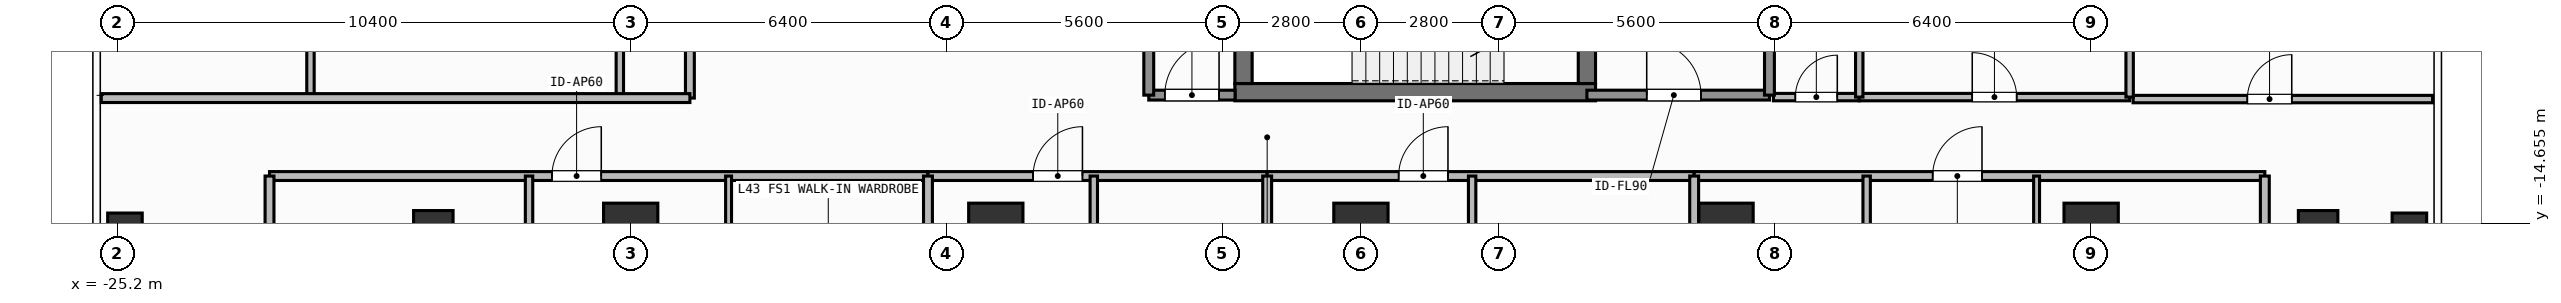
"""IFC4 building model, lengths in metres.
Left out: names, types, materials, properties, quantities, classifications, styles, units other than length and angle.
Written with IfcOpenShell. Run it as: python <this file> out.ifc"""

import sys

from ifc_helpers import new_model, si_unit, direction, frame, frame_2d, origin, origin_2d, place, context, subcontext, project, spatial, rectangle, hollow_rectangle, extrude, element, fill, save


model = new_model("IFC4")
c1 = context("Model", 3, precision=1e-05, world=origin(), true_north=direction((0.0, 1.0)))
c2 = subcontext(c1, "Body", "Model", "MODEL_VIEW")
j1 = project(units=[si_unit("LENGTHUNIT", "METRE"), si_unit("PLANEANGLEUNIT", "RADIAN")], contexts=[c1])
p1 = place(None, origin())
s1 = spatial("IfcSite", under=j1, at=p1, CompositionType="ELEMENT")
p2 = place(p1, origin())
s2 = spatial("IfcBuilding", under=s1, at=p2, CompositionType="ELEMENT")
p3 = place(p2, frame((0.0, 0.0, 175.8)))
s3 = spatial("IfcBuildingStorey", under=s2, at=p3, CompositionType="ELEMENT", Elevation=175.8)
p4 = place(p3, frame((-2.555, -12.0, 0.0), z_axis=(0.0, 0.0, 1.0), x_axis=(1.0, 0.0, 0.0)))
e1 = element("IfcWall", 1, at=p4, inside=s3, PredefinedType="SHEAR", context=c2, shape_type="SweptSolid", body=[
    extrude(rectangle(XDim=7.31, YDim=0.35, at=frame_2d((3.655, 0.0))), origin(), (0.0, 0.0, 1.0), 3.9),
])
p5 = place(p3, frame((-2.38, -11.825, 0.0), z_axis=(0.0, 0.0, 1.0), x_axis=(0.0, 1.0, 0.0)))
e2 = element("IfcWall", 2, at=p5, inside=s3, PredefinedType="SHEAR", context=c2, shape_type="SweptSolid", body=[
    extrude(rectangle(XDim=2.925, YDim=0.35, at=frame_2d((1.462, 0.0))), origin(), (0.0, 0.0, 1.0), 3.9),
])
p6 = place(p3, frame((4.58, -8.9, 0.0), z_axis=(0.0, 0.0, 1.0), x_axis=(0.0, -1.0, 0.0)))
e3 = element("IfcWall", 3, at=p6, inside=s3, PredefinedType="SHEAR", context=c2, shape_type="SweptSolid", body=[
    extrude(rectangle(XDim=2.925, YDim=0.35, at=frame_2d((1.462, 0.0))), origin(), (0.0, 0.0, 1.0), 3.9),
])
p7 = place(p6, frame((0.913, 0.0, 0.0)))
e4 = element("IfcOpeningElement", 4, at=p7, cuts=e3, PredefinedType="OPENING", context=c2, shape_type="SweptSolid", body=[
    extrude(rectangle(XDim=1.1, YDim=2.15, at=frame_2d((0.55, 1.075))), frame((0.0, 0.185, 0.0), z_axis=(0.0, -1.0, 0.0), x_axis=(1.0, 0.0, 0.0)), (0.0, 0.0, 1.0), 0.37),
])
for number, where, z_axis, x_axis in (
    (5, (-14.8, -14.8, 0.0), (0.0, 0.0, 1.0), (1.0, 0.0, 0.0)),
    (6, (-7.4, -14.8, 0.0), (0.0, 0.0, 1.0), (1.0, 0.0, 0.0)),
    (7, (0.0, -14.8, 0.0), (0.0, 0.0, 1.0), (1.0, 0.0, 0.0)),
    (8, (7.4, -14.8, 0.0), (0.0, 0.0, 1.0), (1.0, 0.0, 0.0)),
    (9, (14.8, -14.8, 0.0), (0.0, 0.0, 1.0), (1.0, 0.0, 0.0)),
):
    element("IfcColumn", number, at=place(p3, frame(where, z_axis=z_axis, x_axis=x_axis)), inside=s3, PredefinedType="COLUMN", context=c2, shape_type="SweptSolid", body=[
        extrude(rectangle(XDim=1.1, YDim=1.1, at=origin_2d()), origin(), (0.0, 0.0, 1.0), 3.9),
    ])
for number, where, z_axis, x_axis in (
    (10, (-18.8, -14.8, 0.0), (0.0, 0.0, 1.0), (1.0, 0.0, 0.0)),
    (11, (19.4, -14.8, 0.0), (0.0, 0.0, 1.0), (1.0, 0.0, 0.0)),
):
    element("IfcColumn", number, at=place(p3, frame(where, z_axis=z_axis, x_axis=x_axis)), inside=s3, PredefinedType="COLUMN", context=c2, shape_type="SweptSolid", body=[
        extrude(hollow_rectangle(XDim=0.8, YDim=0.8, WallThickness=0.036, at=origin_2d()), origin(), (0.0, 0.0, 1.0), 3.9),
    ])
for number, where, z_axis, x_axis in (
    (12, (-25.05, -14.8, 0.0), (0.0, 0.0, 1.0), (1.0, 0.0, 0.0)),
    (13, (21.25, -14.8, 0.0), (0.0, 0.0, 1.0), (1.0, 0.0, 0.0)),
):
    element("IfcColumn", number, at=place(p3, frame(where, z_axis=z_axis, x_axis=x_axis)), inside=s3, PredefinedType="COLUMN", context=c2, shape_type="SweptSolid", body=[
        extrude(hollow_rectangle(XDim=0.7, YDim=0.7, WallThickness=0.032, at=origin_2d()), origin(), (0.0, 0.0, 1.0), 3.9),
    ])
p8 = place(p3, frame((4.58, -12.06, 0.0), z_axis=(0.0, 0.0, 1.0), x_axis=(1.0, 0.0, 0.0)))
e14 = element("IfcWall", 14, at=p8, inside=s3, PredefinedType="SOLIDWALL", context=c2, shape_type="SweptSolid", body=[
    extrude(rectangle(XDim=3.7, YDim=0.2, at=frame_2d((1.85, 0.0))), origin(), (0.0, 0.0, 1.0), 3.68),
])
p9 = place(p8, frame((1.212, 0.0, 0.0)))
e15 = element("IfcOpeningElement", 15, at=p9, cuts=e14, PredefinedType="OPENING", context=c2, shape_type="SweptSolid", body=[
    extrude(rectangle(XDim=1.1, YDim=2.15, at=frame_2d((0.55, 1.075))), frame((0.0, 0.11, 0.0), z_axis=(0.0, -1.0, 0.0), x_axis=(1.0, 0.0, 0.0)), (0.0, 0.0, 1.0), 0.22),
])
p10 = place(p3, frame((-4.3, -12.06, 0.0), z_axis=(0.0, 0.0, 1.0), x_axis=(1.0, 0.0, 0.0)))
e16 = element("IfcWall", 16, at=p10, inside=s3, PredefinedType="SOLIDWALL", context=c2, shape_type="SweptSolid", body=[
    extrude(rectangle(XDim=1.75, YDim=0.2, at=frame_2d((0.875, 0.0))), origin(), (0.0, 0.0, 1.0), 3.68),
])
p11 = place(p10, frame((0.325, 0.0, 0.0)))
e17 = element("IfcOpeningElement", 17, at=p11, cuts=e16, PredefinedType="OPENING", context=c2, shape_type="SweptSolid", body=[
    extrude(rectangle(XDim=1.1, YDim=2.15, at=frame_2d((0.55, 1.075))), frame((0.0, 0.11, 0.0), z_axis=(0.0, -1.0, 0.0), x_axis=(1.0, 0.0, 0.0)), (0.0, 0.0, 1.0), 0.22),
])
p12 = place(p3, frame((8.36, -12.1, 0.0), z_axis=(0.0, 0.0, 1.0), x_axis=(1.0, 0.0, 0.0)))
e18 = element("IfcWall", 18, at=p12, inside=s3, PredefinedType="PARTITIONING", context=c2, shape_type="SweptSolid", body=[
    extrude(rectangle(XDim=1.74, YDim=0.15, at=frame_2d((0.87, 0.0))), origin(), (0.0, 0.0, 1.0), 3.68),
])
p13 = place(p12, frame((0.445, 0.0, 0.0)))
e19 = element("IfcOpeningElement", 19, at=p13, cuts=e18, PredefinedType="OPENING", context=c2, shape_type="SweptSolid", body=[
    extrude(rectangle(XDim=0.85, YDim=2.1, at=frame_2d((0.425, 1.05))), frame((0.0, 0.085, 0.0), z_axis=(0.0, -1.0, 0.0), x_axis=(1.0, 0.0, 0.0)), (0.0, 0.0, 1.0), 0.17),
])
p14 = place(p3, frame((10.1, -12.1, 0.0), z_axis=(0.0, 0.0, 1.0), x_axis=(1.0, 0.0, 0.0)))
e20 = element("IfcWall", 20, at=p14, inside=s3, PredefinedType="PARTITIONING", context=c2, shape_type="SweptSolid", body=[
    extrude(rectangle(XDim=5.48, YDim=0.15, at=frame_2d((2.74, 0.0))), origin(), (0.0, 0.0, 1.0), 3.68),
])
p15 = place(p14, frame((2.29, 0.0, 0.0)))
e21 = element("IfcOpeningElement", 21, at=p15, cuts=e20, PredefinedType="OPENING", context=c2, shape_type="SweptSolid", body=[
    extrude(rectangle(XDim=0.9, YDim=2.1, at=frame_2d((0.45, 1.05))), frame((0.0, 0.085, 0.0), z_axis=(0.0, -1.0, 0.0), x_axis=(1.0, 0.0, 0.0)), (0.0, 0.0, 1.0), 0.17),
])
p16 = place(p3, frame((-22.12, -13.7, 0.0), z_axis=(0.0, 0.0, 1.0), x_axis=(1.0, 0.0, 0.0)))
e22 = element("IfcWall", 22, at=p16, inside=s3, PredefinedType="PARTITIONING", context=c2, shape_type="SweptSolid", body=[
    extrude(rectangle(XDim=13.345, YDim=0.18, at=frame_2d((6.673, 0.0))), origin(), (0.0, 0.0, 1.0), 3.68),
])
p17 = place(p16, frame((5.724, 0.0, 0.0)))
e23 = element("IfcOpeningElement", 23, at=p17, cuts=e22, PredefinedType="OPENING", context=c2, shape_type="SweptSolid", body=[
    extrude(rectangle(XDim=1.0, YDim=2.2, at=frame_2d((0.5, 1.1))), frame((0.0, 0.1, 0.0), z_axis=(0.0, -1.0, 0.0), x_axis=(1.0, 0.0, 0.0)), (0.0, 0.0, 1.0), 0.2),
])
p18 = place(p3, frame((-16.86, -19.39, 0.0), z_axis=(0.0, 0.0, 1.0), x_axis=(0.0, 1.0, 0.0)))
e24 = element("IfcWall", 24, at=p18, inside=s3, PredefinedType="PARTITIONING", context=c2, shape_type="SweptSolid", body=[
    extrude(rectangle(XDim=5.69, YDim=0.15, at=frame_2d((2.845, 0.0))), origin(), (0.0, 0.0, 1.0), 3.68),
])
p19 = place(p18, frame((2.42, 0.0, 0.0)))
e25 = element("IfcOpeningElement", 25, at=p19, cuts=e24, PredefinedType="OPENING", context=c2, shape_type="SweptSolid", body=[
    extrude(rectangle(XDim=0.85, YDim=2.1, at=frame_2d((0.425, 1.05))), frame((0.0, 0.085, 0.0), z_axis=(0.0, -1.0, 0.0), x_axis=(1.0, 0.0, 0.0)), (0.0, 0.0, 1.0), 0.17),
])
p20 = place(p3, frame((-12.816, -17.137, 0.0), z_axis=(0.0, 0.0, 1.0), x_axis=(0.0, 1.0, 0.0)))
e26 = element("IfcWall", 26, at=p20, inside=s3, PredefinedType="PARTITIONING", context=c2, shape_type="SweptSolid", body=[
    extrude(rectangle(XDim=3.437, YDim=0.12, at=frame_2d((1.719, 0.0))), origin(), (0.0, 0.0, 1.0), 3.68),
])
p21 = place(p20, frame((0.857, 0.0, 0.0)))
e27 = element("IfcOpeningElement", 27, at=p21, cuts=e26, PredefinedType="OPENING", context=c2, shape_type="SweptSolid", body=[
    extrude(rectangle(XDim=0.85, YDim=2.1, at=frame_2d((0.425, 1.05))), frame((0.0, 0.07, 0.0), z_axis=(0.0, -1.0, 0.0), x_axis=(1.0, 0.0, 0.0)), (0.0, 0.0, 1.0), 0.14),
])
p22 = place(p3, frame((-8.775, -13.7, 0.0), z_axis=(0.0, 0.0, 1.0), x_axis=(1.0, 0.0, 0.0)))
e28 = element("IfcWall", 28, at=p22, inside=s3, PredefinedType="PARTITIONING", context=c2, shape_type="SweptSolid", body=[
    extrude(rectangle(XDim=6.875, YDim=0.18, at=frame_2d((3.438, 0.0))), origin(), (0.0, 0.0, 1.0), 3.68),
])
p23 = place(p22, frame((2.131, 0.0, 0.0)))
e29 = element("IfcOpeningElement", 29, at=p23, cuts=e28, PredefinedType="OPENING", context=c2, shape_type="SweptSolid", body=[
    extrude(rectangle(XDim=1.0, YDim=2.2, at=frame_2d((0.5, 1.1))), frame((0.0, 0.1, 0.0), z_axis=(0.0, -1.0, 0.0), x_axis=(1.0, 0.0, 0.0)), (0.0, 0.0, 1.0), 0.2),
])
p24 = place(p3, frame((-5.414, -16.829, 0.0), z_axis=(0.0, 0.0, 1.0), x_axis=(0.0, 1.0, 0.0)))
e30 = element("IfcWall", 30, at=p24, inside=s3, PredefinedType="PARTITIONING", context=c2, shape_type="SweptSolid", body=[
    extrude(rectangle(XDim=3.129, YDim=0.15, at=frame_2d((1.564, 0.0))), origin(), (0.0, 0.0, 1.0), 3.68),
])
p25 = place(p24, frame((0.516, 0.0, 0.0)))
e31 = element("IfcOpeningElement", 31, at=p25, cuts=e30, PredefinedType="OPENING", context=c2, shape_type="SweptSolid", body=[
    extrude(rectangle(XDim=0.85, YDim=2.1, at=frame_2d((0.425, 1.05))), frame((0.0, 0.085, 0.0), z_axis=(0.0, -1.0, 0.0), x_axis=(1.0, 0.0, 0.0)), (0.0, 0.0, 1.0), 0.17),
])
p26 = place(p3, frame((-1.9, -13.7, 0.0), z_axis=(0.0, 0.0, 1.0), x_axis=(1.0, 0.0, 0.0)))
e32 = element("IfcWall", 32, at=p26, inside=s3, PredefinedType="PARTITIONING", context=c2, shape_type="SweptSolid", body=[
    extrude(rectangle(XDim=8.654, YDim=0.18, at=frame_2d((4.327, 0.0))), origin(), (0.0, 0.0, 1.0), 3.68),
])
p27 = place(p26, frame((2.664, 0.0, 0.0)))
e33 = element("IfcOpeningElement", 33, at=p27, cuts=e32, PredefinedType="OPENING", context=c2, shape_type="SweptSolid", body=[
    extrude(rectangle(XDim=1.0, YDim=2.2, at=frame_2d((0.5, 1.1))), frame((0.0, 0.1, 0.0), z_axis=(0.0, -1.0, 0.0), x_axis=(1.0, 0.0, 0.0)), (0.0, 0.0, 1.0), 0.2),
])
p28 = place(p3, frame((2.254, -16.829, 0.0), z_axis=(0.0, 0.0, 1.0), x_axis=(0.0, 1.0, 0.0)))
e34 = element("IfcWall", 34, at=p28, inside=s3, PredefinedType="PARTITIONING", context=c2, shape_type="SweptSolid", body=[
    extrude(rectangle(XDim=3.129, YDim=0.15, at=frame_2d((1.564, 0.0))), origin(), (0.0, 0.0, 1.0), 3.68),
])
p29 = place(p28, frame((1.229, 0.0, 0.0)))
e35 = element("IfcOpeningElement", 35, at=p29, cuts=e34, PredefinedType="OPENING", context=c2, shape_type="SweptSolid", body=[
    extrude(rectangle(XDim=0.85, YDim=2.1, at=frame_2d((0.425, 1.05))), frame((0.0, 0.085, 0.0), z_axis=(0.0, -1.0, 0.0), x_axis=(1.0, 0.0, 0.0)), (0.0, 0.0, 1.0), 0.17),
])
p30 = place(p3, frame((6.754, -13.7, 0.0), z_axis=(0.0, 0.0, 1.0), x_axis=(1.0, 0.0, 0.0)))
e36 = element("IfcWall", 36, at=p30, inside=s3, PredefinedType="PARTITIONING", context=c2, shape_type="SweptSolid", body=[
    extrude(rectangle(XDim=11.566, YDim=0.18, at=frame_2d((5.783, 0.0))), origin(), (0.0, 0.0, 1.0), 3.68),
])
p31 = place(p30, frame((4.833, 0.0, 0.0)))
e37 = element("IfcOpeningElement", 37, at=p31, cuts=e36, PredefinedType="OPENING", context=c2, shape_type="SweptSolid", body=[
    extrude(rectangle(XDim=1.0, YDim=2.2, at=frame_2d((0.5, 1.1))), frame((0.0, 0.1, 0.0), z_axis=(0.0, -1.0, 0.0), x_axis=(1.0, 0.0, 0.0)), (0.0, 0.0, 1.0), 0.2),
])
p32 = place(p3, frame((10.25, -19.584, 0.0), z_axis=(0.0, 0.0, 1.0), x_axis=(0.0, 1.0, 0.0)))
e38 = element("IfcWall", 38, at=p32, inside=s3, PredefinedType="PARTITIONING", context=c2, shape_type="SweptSolid", body=[
    extrude(rectangle(XDim=5.884, YDim=0.15, at=frame_2d((2.942, 0.0))), origin(), (0.0, 0.0, 1.0), 3.68),
])
p33 = place(p32, frame((2.604, 0.0, 0.0)))
e39 = element("IfcOpeningElement", 39, at=p33, cuts=e38, PredefinedType="OPENING", context=c2, shape_type="SweptSolid", body=[
    extrude(rectangle(XDim=0.85, YDim=2.1, at=frame_2d((0.425, 1.05))), frame((0.0, 0.085, 0.0), z_axis=(0.0, -1.0, 0.0), x_axis=(1.0, 0.0, 0.0)), (0.0, 0.0, 1.0), 0.17),
])
p34 = place(p3, frame((13.694, -17.619, 0.0), z_axis=(0.0, 0.0, 1.0), x_axis=(0.0, 1.0, 0.0)))
e40 = element("IfcWall", 40, at=p34, inside=s3, PredefinedType="PARTITIONING", context=c2, shape_type="SweptSolid", body=[
    extrude(rectangle(XDim=3.919, YDim=0.12, at=frame_2d((1.959, 0.0))), origin(), (0.0, 0.0, 1.0), 3.68),
])
p35 = place(p34, frame((1.363, 0.0, 0.0)))
e41 = element("IfcOpeningElement", 41, at=p35, cuts=e40, PredefinedType="OPENING", context=c2, shape_type="SweptSolid", body=[
    extrude(rectangle(XDim=0.85, YDim=2.1, at=frame_2d((0.425, 1.05))), frame((0.0, 0.07, 0.0), z_axis=(0.0, -1.0, 0.0), x_axis=(1.0, 0.0, 0.0)), (0.0, 0.0, 1.0), 0.14),
])
p36 = place(p3, frame((-13.6, -12.12, 0.0), z_axis=(0.0, 0.0, 1.0), x_axis=(0.0, 1.0, 0.0)))
e42 = element("IfcWall", 42, at=p36, inside=s3, PredefinedType="PARTITIONING", context=c2, shape_type="SweptSolid", body=[
    extrude(rectangle(XDim=24.24, YDim=0.18, at=frame_2d((12.12, 0.0))), origin(), (0.0, 0.0, 1.0), 3.68),
])
p37 = place(p36, frame((11.62, 0.0, 0.0)))
e43 = element("IfcOpeningElement", 43, at=p37, cuts=e42, PredefinedType="OPENING", context=c2, shape_type="SweptSolid", body=[
    extrude(rectangle(XDim=1.0, YDim=2.2, at=frame_2d((0.5, 1.1))), frame((0.0, 0.1, 0.0), z_axis=(0.0, -1.0, 0.0), x_axis=(1.0, 0.0, 0.0)), (0.0, 0.0, 1.0), 0.2),
])
p38 = place(p3, frame((-15.02, -12.12, 0.0), z_axis=(0.0, 0.0, 1.0), x_axis=(0.0, 1.0, 0.0)))
e44 = element("IfcWall", 44, at=p38, inside=s3, PredefinedType="PARTITIONING", context=c2, shape_type="SweptSolid", body=[
    extrude(rectangle(XDim=6.684, YDim=0.15, at=frame_2d((3.342, 0.0))), origin(), (0.0, 0.0, 1.0), 3.082),
])
p39 = place(p38, frame((2.828, 0.0, 0.0)))
e45 = element("IfcOpeningElement", 45, at=p39, cuts=e44, PredefinedType="OPENING", context=c2, shape_type="SweptSolid", body=[
    extrude(rectangle(XDim=0.85, YDim=2.1, at=frame_2d((0.425, 1.05))), frame((0.0, 0.085, 0.0), z_axis=(0.0, -1.0, 0.0), x_axis=(1.0, 0.0, 0.0)), (0.0, 0.0, 1.0), 0.17),
])
p40 = place(p3, frame((15.65, -12.14, 0.0), z_axis=(0.0, 0.0, 1.0), x_axis=(1.0, 0.0, 0.0)))
e46 = element("IfcWall", 46, at=p40, inside=s3, PredefinedType="PARTITIONING", context=c2, shape_type="SweptSolid", body=[
    extrude(rectangle(XDim=6.07, YDim=0.15, at=frame_2d((3.035, 0.0))), origin(), (0.0, 0.0, 1.0), 3.68),
])
p41 = place(p40, frame((2.316, 0.0, 0.0)))
e47 = element("IfcOpeningElement", 47, at=p41, cuts=e46, PredefinedType="OPENING", context=c2, shape_type="SweptSolid", body=[
    extrude(rectangle(XDim=0.9, YDim=2.1, at=frame_2d((0.45, 1.05))), frame((0.0, 0.085, 0.0), z_axis=(0.0, -1.0, 0.0), x_axis=(1.0, 0.0, 0.0)), (0.0, 0.0, 1.0), 0.17),
])
for number, where, z_axis, x_axis in (
    (48, (8.28, -12.06, 0.0), (0.0, 0.0, 1.0), (0.0, 1.0, 0.0)),
    (49, (-4.3, -12.06, 0.0), (0.0, 0.0, 1.0), (0.0, 1.0, 0.0)),
):
    element("IfcWall", number, at=place(p3, frame(where, z_axis=z_axis, x_axis=x_axis)), inside=s3, PredefinedType="SOLIDWALL", context=c2, shape_type="SweptSolid", body=[
        extrude(rectangle(XDim=3.26, YDim=0.2, at=frame_2d((1.63, 0.0))), origin(), (0.0, 0.0, 1.0), 3.68),
    ])
p42 = place(p3, frame((10.1, -12.1, 0.0), z_axis=(0.0, 0.0, 1.0), x_axis=(0.0, 1.0, 0.0)))
e50 = element("IfcWall", 50, at=p42, inside=s3, PredefinedType="PARTITIONING", context=c2, shape_type="SweptSolid", body=[
    extrude(rectangle(XDim=2.35, YDim=0.15, at=frame_2d((1.175, 0.0))), origin(), (0.0, 0.0, 1.0), 3.68),
])
p43 = place(p3, frame((15.58, -12.1, 0.0), z_axis=(0.0, 0.0, 1.0), x_axis=(0.0, 1.0, 0.0)))
e51 = element("IfcWall", 51, at=p43, inside=s3, PredefinedType="PARTITIONING", context=c2, shape_type="SweptSolid", body=[
    extrude(rectangle(XDim=6.25, YDim=0.15, at=frame_2d((3.125, 0.0))), origin(), (0.0, 0.0, 1.0), 3.68),
])
for number, where, z_axis, x_axis in (
    (52, (-22.12, -22.51, 0.0), (0.0, 0.0, 1.0), (0.0, 1.0, 0.0)),
    (53, (18.32, -22.51, 0.0), (0.0, 0.0, 1.0), (0.0, 1.0, 0.0)),
):
    element("IfcWall", number, at=place(p3, frame(where, z_axis=z_axis, x_axis=x_axis)), inside=s3, PredefinedType="PARTITIONING", context=c2, shape_type="SweptSolid", body=[
        extrude(rectangle(XDim=8.81, YDim=0.18, at=frame_2d((4.405, 0.0))), origin(), (0.0, 0.0, 1.0), 3.68),
    ])
for number, where, z_axis, x_axis in (
    (54, (-8.775, -23.63, 0.0), (0.0, 0.0, 1.0), (0.0, 1.0, 0.0)),
    (55, (-1.9, -23.63, 0.0), (0.0, 0.0, 1.0), (0.0, 1.0, 0.0)),
    (56, (6.754, -23.63, 0.0), (0.0, 0.0, 1.0), (0.0, 1.0, 0.0)),
):
    element("IfcWall", number, at=place(p3, frame(where, z_axis=z_axis, x_axis=x_axis)), inside=s3, PredefinedType="PARTITIONING", context=c2, shape_type="SweptSolid", body=[
        extrude(rectangle(XDim=9.93, YDim=0.18, at=frame_2d((4.965, 0.0))), origin(), (0.0, 0.0, 1.0), 3.68),
    ])
p44 = place(p3, frame((-21.29, -12.12, 0.0), z_axis=(0.0, 0.0, 1.0), x_axis=(0.0, 1.0, 0.0)))
e57 = element("IfcWall", 57, at=p44, inside=s3, PredefinedType="PARTITIONING", context=c2, shape_type="SweptSolid", body=[
    extrude(rectangle(XDim=6.684, YDim=0.15, at=frame_2d((3.342, 0.0))), origin(), (0.0, 0.0, 1.0), 3.68),
])
p45 = place(p3, frame((-25.53, -12.12, 0.0), z_axis=(0.0, 0.0, 1.0), x_axis=(1.0, 0.0, 0.0)))
e58 = element("IfcWall", 58, at=p45, inside=s3, PredefinedType="PARTITIONING", context=c2, shape_type="SweptSolid", body=[
    extrude(rectangle(XDim=11.93, YDim=0.18, at=frame_2d((5.965, 0.0))), origin(), (0.0, 0.0, 1.0), 3.68),
])
p46 = place(p9, origin())
e59 = element("IfcDoor", 59, at=p46, inside=s3, OperationType="SINGLE_SWING_LEFT", PredefinedType="DOOR", context=c2, shape_type="SweptSolid", body=[
    extrude(rectangle(XDim=1.1, YDim=2.15, at=frame_2d((0.55, 1.075))), frame((0.0, 0.025, 0.0), z_axis=(0.0, -1.0, 0.0), x_axis=(1.0, 0.0, 0.0)), (0.0, 0.0, 1.0), 0.05),
])
fill(e15, e59)
p47 = place(p11, origin())
e60 = element("IfcDoor", 60, at=p47, inside=s3, OperationType="SINGLE_SWING_RIGHT", PredefinedType="DOOR", context=c2, shape_type="SweptSolid", body=[
    extrude(rectangle(XDim=1.1, YDim=2.15, at=frame_2d((0.55, 1.075))), frame((0.0, 0.025, 0.0), z_axis=(0.0, -1.0, 0.0), x_axis=(1.0, 0.0, 0.0)), (0.0, 0.0, 1.0), 0.05),
])
fill(e17, e60)
p48 = place(p13, origin())
e61 = element("IfcDoor", 61, at=p48, inside=s3, OperationType="SINGLE_SWING_RIGHT", PredefinedType="DOOR", context=c2, shape_type="SweptSolid", body=[
    extrude(rectangle(XDim=0.85, YDim=2.1, at=frame_2d((0.425, 1.05))), frame((0.0, 0.025, 0.0), z_axis=(0.0, -1.0, 0.0), x_axis=(1.0, 0.0, 0.0)), (0.0, 0.0, 1.0), 0.05),
])
fill(e19, e61)
p49 = place(p15, origin())
e62 = element("IfcDoor", 62, at=p49, inside=s3, OperationType="SINGLE_SWING_LEFT", PredefinedType="DOOR", context=c2, shape_type="SweptSolid", body=[
    extrude(rectangle(XDim=0.9, YDim=2.1, at=frame_2d((0.45, 1.05))), frame((0.0, 0.025, 0.0), z_axis=(0.0, -1.0, 0.0), x_axis=(1.0, 0.0, 0.0)), (0.0, 0.0, 1.0), 0.05),
])
fill(e21, e62)
p50 = place(p17, origin())
e63 = element("IfcDoor", 63, at=p50, inside=s3, OperationType="SINGLE_SWING_RIGHT", PredefinedType="DOOR", context=c2, shape_type="SweptSolid", body=[
    extrude(rectangle(XDim=1.0, YDim=2.2, at=frame_2d((0.5, 1.1))), frame((0.0, 0.025, 0.0), z_axis=(0.0, -1.0, 0.0), x_axis=(1.0, 0.0, 0.0)), (0.0, 0.0, 1.0), 0.05),
])
fill(e23, e63)
p51 = place(p23, origin())
e64 = element("IfcDoor", 64, at=p51, inside=s3, OperationType="SINGLE_SWING_RIGHT", PredefinedType="DOOR", context=c2, shape_type="SweptSolid", body=[
    extrude(rectangle(XDim=1.0, YDim=2.2, at=frame_2d((0.5, 1.1))), frame((0.0, 0.025, 0.0), z_axis=(0.0, -1.0, 0.0), x_axis=(1.0, 0.0, 0.0)), (0.0, 0.0, 1.0), 0.05),
])
fill(e29, e64)
p52 = place(p27, origin())
e65 = element("IfcDoor", 65, at=p52, inside=s3, OperationType="SINGLE_SWING_RIGHT", PredefinedType="DOOR", context=c2, shape_type="SweptSolid", body=[
    extrude(rectangle(XDim=1.0, YDim=2.2, at=frame_2d((0.5, 1.1))), frame((0.0, 0.025, 0.0), z_axis=(0.0, -1.0, 0.0), x_axis=(1.0, 0.0, 0.0)), (0.0, 0.0, 1.0), 0.05),
])
fill(e33, e65)
p53 = place(p31, origin())
e66 = element("IfcDoor", 66, at=p53, inside=s3, OperationType="SINGLE_SWING_RIGHT", PredefinedType="DOOR", context=c2, shape_type="SweptSolid", body=[
    extrude(rectangle(XDim=1.0, YDim=2.2, at=frame_2d((0.5, 1.1))), frame((0.0, 0.025, 0.0), z_axis=(0.0, -1.0, 0.0), x_axis=(1.0, 0.0, 0.0)), (0.0, 0.0, 1.0), 0.05),
])
fill(e37, e66)
p54 = place(p41, origin())
e67 = element("IfcDoor", 67, at=p54, inside=s3, OperationType="SINGLE_SWING_RIGHT", PredefinedType="DOOR", context=c2, shape_type="SweptSolid", body=[
    extrude(rectangle(XDim=0.9, YDim=2.1, at=frame_2d((0.45, 1.05))), frame((0.0, 0.025, 0.0), z_axis=(0.0, -1.0, 0.0), x_axis=(1.0, 0.0, 0.0)), (0.0, 0.0, 1.0), 0.05),
])
fill(e47, e67)
save(model, sys.argv[1])
